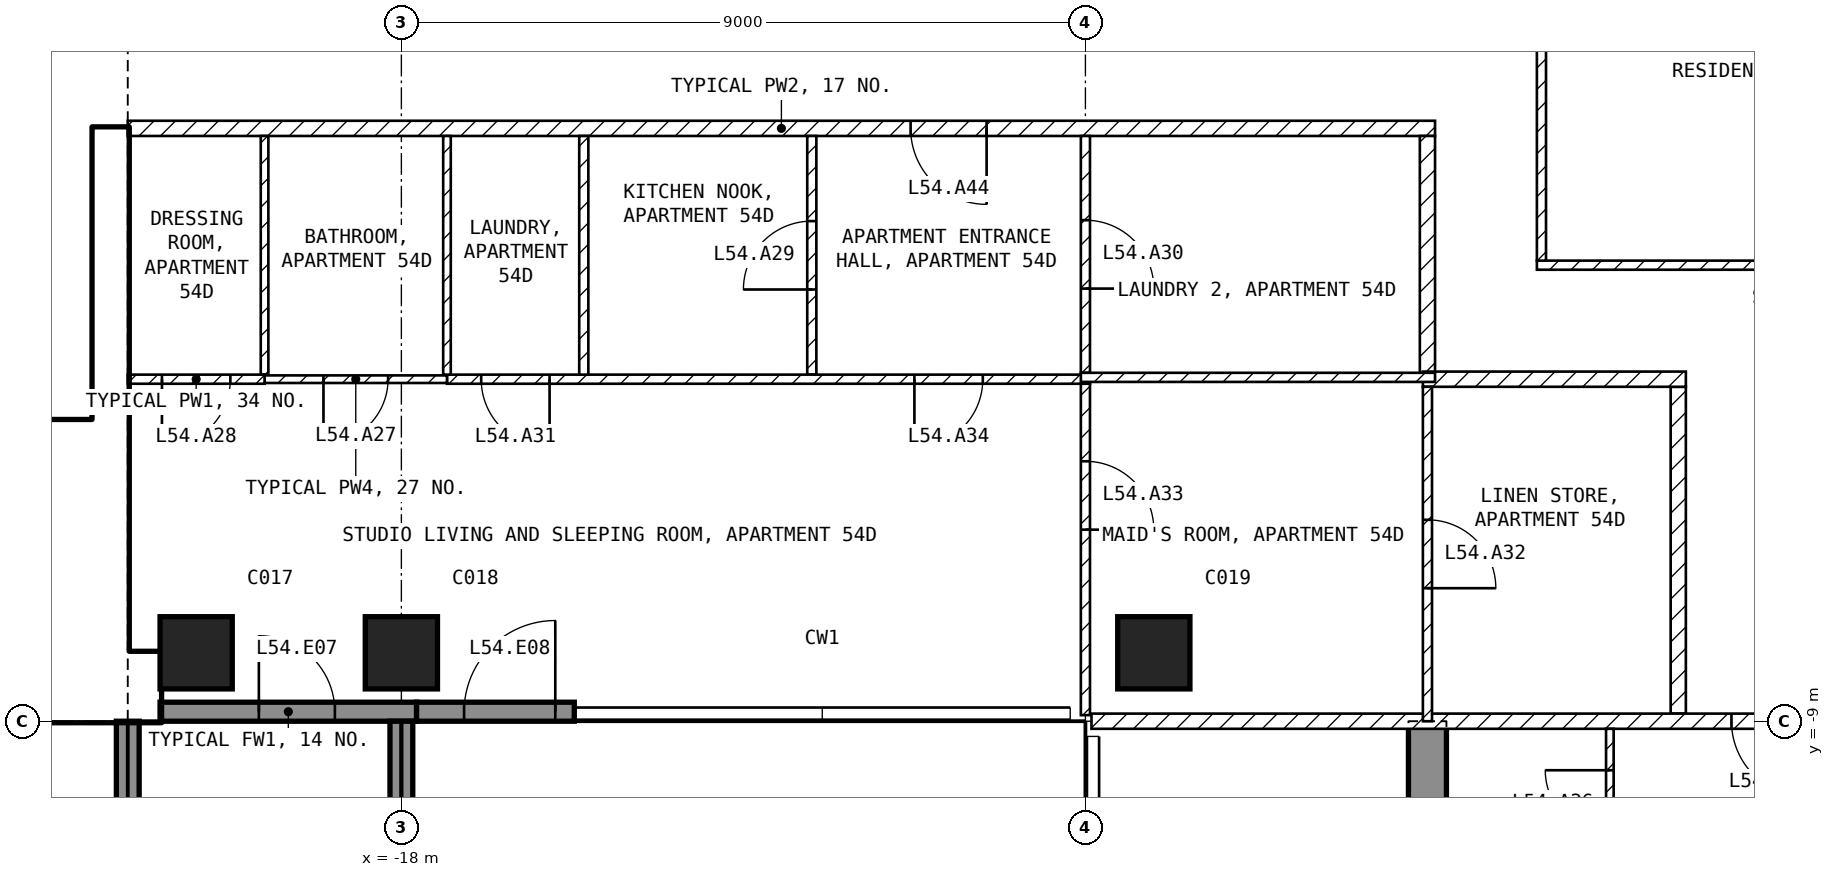
"""IFC4 building model, lengths in metres.
Left out: names, types, materials, properties, quantities, classifications, styles, units other than length and angle.
Written with IfcOpenShell. Run it as: python <this file> out.ifc"""

import sys

from ifc_helpers import new_model, si_unit, direction, frame, frame_2d, origin, origin_2d, place, context, subcontext, project, spatial, polyline, rectangle, outline, extrude, element, fill, save


model = new_model("IFC4")
c1 = context("Model", 3, precision=1e-05, world=origin(), true_north=direction((0.0, 1.0)))
c2 = subcontext(c1, "Body", "Model", "MODEL_VIEW")
j1 = project(units=[si_unit("LENGTHUNIT", "METRE"), si_unit("PLANEANGLEUNIT", "RADIAN")], contexts=[c1])
p1 = place(None, origin())
s1 = spatial("IfcSite", under=j1, at=p1, CompositionType="ELEMENT")
p2 = place(p1, origin())
s2 = spatial("IfcBuilding", under=s1, at=p2, CompositionType="ELEMENT")
p3 = place(p2, frame((0.0, 0.0, 215.6)))
s3 = spatial("IfcBuildingStorey", under=s2, at=p3, CompositionType="ELEMENT", Elevation=215.6)
for number, where, z_axis, x_axis in (
    (1, (-20.7, -8.1, -0.25), (0.0, 0.0, 1.0), (1.0, 0.0, 0.0)),
    (2, (-18.0, -8.1, -0.25), (0.0, 0.0, 1.0), (1.0, 0.0, 0.0)),
    (3, (-8.1, -8.1, -0.25), (0.0, 0.0, 1.0), (1.0, 0.0, 0.0)),
):
    element("IfcColumn", number, at=place(p3, frame(where, z_axis=z_axis, x_axis=x_axis)), inside=s3, PredefinedType="COLUMN", context=c2, shape_type="SweptSolid", body=[
        extrude(rectangle(XDim=0.95, YDim=0.95, at=origin_2d()), origin(), (0.0, 0.0, 1.0), 3.5),
    ])
p4 = place(p3, frame((-4.75, -20.225, -0.25), z_axis=(1.0, 0.0, 0.0), x_axis=(0.0, 1.0, 0.0)))
e4 = element("IfcWall", 4, at=p4, inside=s3, PredefinedType="SHEAR", context=c2, shape_type="SweptSolid", body=[
    extrude(outline(polyline([(0.0, 0.0), (6.725, 0.0), (6.725, 2.65), (9.125, 2.65), (9.125, 0.0), (11.225, 0.0), (11.225, 3.5), (0.0, 3.5), (0.0, 0.0)])), origin(), (0.0, 0.0, 1.0), 0.5),
])
p5 = place(p3, frame((-21.175, -8.875, 0.0), z_axis=(0.0, 0.0, 1.0), x_axis=(1.0, 0.0, 0.0)))
e5 = element("IfcWall", 5, at=p5, inside=s3, PredefinedType="SOLIDWALL", context=c2, shape_type="SweptSolid", body=[
    extrude(rectangle(XDim=3.375, YDim=0.25, at=frame_2d((1.688, 0.0))), origin(), (0.0, 0.0, 1.0), 3.25),
])
p6 = place(p5, frame((1.3, 0.0, 0.0)))
e6 = element("IfcOpeningElement", 6, at=p6, cuts=e5, PredefinedType="OPENING", context=c2, shape_type="SweptSolid", body=[
    extrude(rectangle(XDim=1.0, YDim=2.4, at=frame_2d((0.5, 1.2))), frame((0.0, 0.135, 0.0), z_axis=(0.0, -1.0, 0.0), x_axis=(1.0, 0.0, 0.0)), (0.0, 0.0, 1.0), 0.27),
])
p7 = place(p3, frame((-17.8, -8.875, 0.0), z_axis=(0.0, 0.0, 1.0), x_axis=(1.0, 0.0, 0.0)))
e7 = element("IfcWall", 7, at=p7, inside=s3, PredefinedType="SOLIDWALL", context=c2, shape_type="SweptSolid", body=[
    extrude(rectangle(XDim=2.075, YDim=0.25, at=frame_2d((1.038, 0.0))), origin(), (0.0, 0.0, 1.0), 3.25),
])
p8 = place(p7, frame((0.625, 0.0, 0.0)))
e8 = element("IfcOpeningElement", 8, at=p8, cuts=e7, PredefinedType="OPENING", context=c2, shape_type="SweptSolid", body=[
    extrude(rectangle(XDim=1.2, YDim=2.4, at=frame_2d((0.6, 1.2))), frame((0.0, 0.135, 0.0), z_axis=(0.0, -1.0, 0.0), x_axis=(1.0, 0.0, 0.0)), (0.0, 0.0, 1.0), 0.27),
])
for number, where, z_axis, x_axis in (
    (9, (-21.6, -9.0, 0.0), (0.0, 0.0, 1.0), (0.0, -1.0, 0.0)),
    (10, (-18.0, -9.0, 0.0), (0.0, 0.0, 1.0), (0.0, -1.0, 0.0)),
):
    element("IfcWall", number, at=place(p3, frame(where, z_axis=z_axis, x_axis=x_axis)), inside=s3, PredefinedType="SOLIDWALL", context=c2, shape_type="SweptSolid", body=[
        extrude(rectangle(XDim=2.7, YDim=0.3, at=frame_2d((1.35, 0.0))), origin(), (0.0, 0.0, 1.0), 3.25),
    ])
p9 = place(p3, frame((-30.2, -8.55, 0.0), z_axis=(0.0, 0.0, 1.0), x_axis=(1.0, 0.0, 0.0)))
e11 = element("IfcWall", 11, at=p9, inside=s3, PredefinedType="SHEAR", context=c2, shape_type="SweptSolid", body=[
    extrude(rectangle(XDim=9.025, YDim=0.9, at=frame_2d((4.512, 0.0))), origin(), (0.0, 0.0, 1.0), 3.25),
])
p10 = place(p3, frame((-21.825, -8.1, 0.0), z_axis=(0.0, 0.0, 1.0), x_axis=(0.0, 1.0, 0.0)))
e12 = element("IfcWall", 12, at=p10, inside=s3, PredefinedType="SHEAR", context=c2, shape_type="SweptSolid", body=[
    extrude(rectangle(XDim=6.9, YDim=0.45, at=frame_2d((3.45, 0.0))), origin(), (0.0, 0.0, 1.0), 3.25),
])
p11 = place(p3, frame((-28.35, -5.15, 0.0), z_axis=(0.0, 0.0, 1.0), x_axis=(1.0, 0.0, 0.0)))
e13 = element("IfcWall", 13, at=p11, inside=s3, PredefinedType="SOLIDWALL", context=c2, shape_type="SweptSolid", body=[
    extrude(rectangle(XDim=6.3, YDim=0.2, at=frame_2d((3.15, 0.0))), origin(), (0.0, 0.0, 1.0), 3.25),
])
p12 = place(p11, frame((5.1, 0.0, 0.0)))
e14 = element("IfcOpeningElement", 14, at=p12, cuts=e13, PredefinedType="OPENING", context=c2, shape_type="SweptSolid", body=[
    extrude(rectangle(XDim=1.0, YDim=2.1, at=frame_2d((0.5, 1.05))), frame((0.0, 0.11, 0.0), z_axis=(0.0, -1.0, 0.0), x_axis=(1.0, 0.0, 0.0)), (0.0, 0.0, 1.0), 0.22),
])
p13 = place(p3, frame((-3.06, -3.0, 0.0), z_axis=(0.0, 0.0, 1.0), x_axis=(1.0, 0.0, 0.0)))
e15 = element("IfcWall", 15, at=p13, inside=s3, PredefinedType="PARTITIONING", context=c2, shape_type="SweptSolid", body=[
    extrude(rectangle(XDim=6.12, YDim=0.12, at=frame_2d((3.06, 0.0))), origin(), (0.0, 0.0, 1.0), 3.25),
])
p14 = place(p3, frame((-3.0, 2.94, 0.0), z_axis=(0.0, 0.0, 1.0), x_axis=(0.0, -1.0, 0.0)))
e16 = element("IfcWall", 16, at=p14, inside=s3, PredefinedType="PARTITIONING", context=c2, shape_type="SweptSolid", body=[
    extrude(rectangle(XDim=5.88, YDim=0.12, at=frame_2d((2.94, 0.0))), origin(), (0.0, 0.0, 1.0), 3.25),
])
p15 = place(p3, frame((-4.4, -1.2, 0.0), z_axis=(0.0, 0.0, 1.0), x_axis=(-1.0, 0.0, 0.0)))
e17 = element("IfcWall", 17, at=p15, inside=s3, PredefinedType="PARTITIONING", context=c2, shape_type="SweptSolid", body=[
    extrude(rectangle(XDim=17.2, YDim=0.2, at=frame_2d((8.6, 0.0))), origin(), (0.0, 0.0, 1.0), 3.25),
])
p16 = place(p15, frame((5.9, 0.0, 0.0)))
e18 = element("IfcOpeningElement", 18, at=p16, cuts=e17, PredefinedType="OPENING", context=c2, shape_type="SweptSolid", body=[
    extrude(rectangle(XDim=1.0, YDim=2.1, at=frame_2d((0.5, 1.05))), frame((0.0, 0.11, 0.0), z_axis=(0.0, -1.0, 0.0), x_axis=(1.0, 0.0, 0.0)), (0.0, 0.0, 1.0), 0.22),
])
p17 = place(p3, frame((-4.5, -4.416, 0.0), z_axis=(0.0, 0.0, 1.0), x_axis=(0.0, 1.0, 0.0)))
e19 = element("IfcWall", 19, at=p17, inside=s3, PredefinedType="PARTITIONING", context=c2, shape_type="SweptSolid", body=[
    extrude(rectangle(XDim=3.116, YDim=0.2, at=frame_2d((1.558, 0.0))), origin(), (0.0, 0.0, 1.0), 3.25),
])
p18 = place(p3, frame((-1.2, -8.9, 0.0), z_axis=(0.0, 0.0, 1.0), x_axis=(0.0, 1.0, 0.0)))
e20 = element("IfcWall", 20, at=p18, inside=s3, PredefinedType="PARTITIONING", context=c2, shape_type="SweptSolid", body=[
    extrude(rectangle(XDim=4.3, YDim=0.2, at=frame_2d((2.15, 0.0))), origin(), (0.0, 0.0, 1.0), 3.25),
])
p19 = place(p3, frame((-1.1, -4.5, 0.0), z_axis=(0.0, 0.0, 1.0), x_axis=(-1.0, 0.0, 0.0)))
e21 = element("IfcWall", 21, at=p19, inside=s3, PredefinedType="PARTITIONING", context=c2, shape_type="SweptSolid", body=[
    extrude(rectangle(XDim=3.46, YDim=0.2, at=frame_2d((1.73, 0.0))), origin(), (0.0, 0.0, 1.0), 3.25),
])
p20 = place(p3, frame((8.92, -9.0, 0.0), z_axis=(0.0, 0.0, 1.0), x_axis=(-1.0, 0.0, 0.0)))
e22 = element("IfcWall", 22, at=p20, inside=s3, PredefinedType="PARTITIONING", context=c2, shape_type="SweptSolid", body=[
    extrude(rectangle(XDim=17.84, YDim=0.2, at=frame_2d((8.92, 0.0))), origin(), (0.0, 0.0, 1.0), 3.25),
])
p21 = place(p20, frame((8.42, 0.0, 0.0)))
e23 = element("IfcOpeningElement", 23, at=p21, cuts=e22, PredefinedType="OPENING", context=c2, shape_type="SweptSolid", body=[
    extrude(rectangle(XDim=1.0, YDim=2.1, at=frame_2d((0.5, 1.05))), frame((0.0, 0.11, 0.0), z_axis=(0.0, -1.0, 0.0), x_axis=(1.0, 0.0, 0.0)), (0.0, 0.0, 1.0), 0.22),
])
p22 = place(p3, frame((-12.6, -4.44, 0.0), z_axis=(0.0, 0.0, 1.0), x_axis=(0.0, 1.0, 0.0)))
e24 = element("IfcWall", 24, at=p22, inside=s3, PredefinedType="PARTITIONING", context=c2, shape_type="SweptSolid", body=[
    extrude(rectangle(XDim=3.14, YDim=0.12, at=frame_2d((1.57, 0.0))), origin(), (0.0, 0.0, 1.0), 3.25),
])
p23 = place(p22, frame((1.12, 0.0, 0.0)))
e25 = element("IfcOpeningElement", 25, at=p23, cuts=e24, PredefinedType="OPENING", context=c2, shape_type="SweptSolid", body=[
    extrude(rectangle(XDim=0.9, YDim=2.1, at=frame_2d((0.45, 1.05))), frame((0.0, 0.07, 0.0), z_axis=(0.0, -1.0, 0.0), x_axis=(1.0, 0.0, 0.0)), (0.0, 0.0, 1.0), 0.14),
])
p24 = place(p3, frame((-8.94, -4.5, 0.0), z_axis=(0.0, 0.0, 1.0), x_axis=(-1.0, 0.0, 0.0)))
e26 = element("IfcWall", 26, at=p24, inside=s3, PredefinedType="PARTITIONING", context=c2, shape_type="SweptSolid", body=[
    extrude(rectangle(XDim=8.46, YDim=0.12, at=frame_2d((4.23, 0.0))), origin(), (0.0, 0.0, 1.0), 3.25),
])
p25 = place(p24, frame((7.11, 0.0, 0.0)))
e27 = element("IfcOpeningElement", 27, at=p25, cuts=e26, PredefinedType="OPENING", context=c2, shape_type="SweptSolid", body=[
    extrude(rectangle(XDim=0.9, YDim=2.1, at=frame_2d((0.45, 1.05))), frame((0.0, 0.07, 0.0), z_axis=(0.0, -1.0, 0.0), x_axis=(1.0, 0.0, 0.0)), (0.0, 0.0, 1.0), 0.14),
])
p26 = place(p24, frame((1.41, 0.0, 0.0)))
e28 = element("IfcOpeningElement", 28, at=p26, cuts=e26, PredefinedType="OPENING", context=c2, shape_type="SweptSolid", body=[
    extrude(rectangle(XDim=0.9, YDim=2.1, at=frame_2d((0.45, 1.05))), frame((0.0, 0.07, 0.0), z_axis=(0.0, -1.0, 0.0), x_axis=(1.0, 0.0, 0.0)), (0.0, 0.0, 1.0), 0.14),
])
p27 = place(p3, frame((-9.0, -1.3, 0.0), z_axis=(0.0, 0.0, 1.0), x_axis=(0.0, -1.0, 0.0)))
e29 = element("IfcWall", 29, at=p27, inside=s3, PredefinedType="PARTITIONING", context=c2, shape_type="SweptSolid", body=[
    extrude(rectangle(XDim=3.116, YDim=0.12, at=frame_2d((1.558, 0.0))), origin(), (0.0, 0.0, 1.0), 3.25),
])
p28 = place(p27, frame((1.108, 0.0, 0.0)))
e30 = element("IfcOpeningElement", 30, at=p28, cuts=e29, PredefinedType="OPENING", context=c2, shape_type="SweptSolid", body=[
    extrude(rectangle(XDim=0.9, YDim=2.1, at=frame_2d((0.45, 1.05))), frame((0.0, 0.07, 0.0), z_axis=(0.0, -1.0, 0.0), x_axis=(1.0, 0.0, 0.0)), (0.0, 0.0, 1.0), 0.14),
])
p29 = place(p3, frame((-15.6, -4.44, 0.0), z_axis=(0.0, 0.0, 1.0), x_axis=(0.0, 1.0, 0.0)))
e31 = element("IfcWall", 31, at=p29, inside=s3, PredefinedType="PARTITIONING", context=c2, shape_type="SweptSolid", body=[
    extrude(rectangle(XDim=3.14, YDim=0.12, at=frame_2d((1.57, 0.0))), origin(), (0.0, 0.0, 1.0), 3.25),
])
for number, where, z_axis, x_axis in (
    (32, (-17.4, -4.44, 0.0), (0.0, 0.0, 1.0), (0.0, 1.0, 0.0)),
    (33, (-19.8, -4.44, 0.0), (0.0, 0.0, 1.0), (0.0, 1.0, 0.0)),
):
    element("IfcWall", number, at=place(p3, frame(where, z_axis=z_axis, x_axis=x_axis)), inside=s3, PredefinedType="PARTITIONING", context=c2, shape_type="SweptSolid", body=[
        extrude(rectangle(XDim=3.14, YDim=0.1, at=frame_2d((1.57, 0.0))), origin(), (0.0, 0.0, 1.0), 3.25),
    ])
p30 = place(p3, frame((-17.4, -4.5, 0.0), z_axis=(0.0, 0.0, 1.0), x_axis=(-1.0, 0.0, 0.0)))
e34 = element("IfcWall", 34, at=p30, inside=s3, PredefinedType="PARTITIONING", context=c2, shape_type="SweptSolid", body=[
    extrude(rectangle(XDim=2.4, YDim=0.1, at=frame_2d((1.2, 0.0))), origin(), (0.0, 0.0, 1.0), 3.25),
])
p31 = place(p30, frame((0.775, 0.0, 0.0)))
e35 = element("IfcOpeningElement", 35, at=p31, cuts=e34, PredefinedType="OPENING", context=c2, shape_type="SweptSolid", body=[
    extrude(rectangle(XDim=0.85, YDim=2.1, at=frame_2d((0.425, 1.05))), frame((0.0, 0.06, 0.0), z_axis=(0.0, -1.0, 0.0), x_axis=(1.0, 0.0, 0.0)), (0.0, 0.0, 1.0), 0.12),
])
p32 = place(p3, frame((-19.8, -4.5, 0.0), z_axis=(0.0, 0.0, 1.0), x_axis=(-1.0, 0.0, 0.0)))
e36 = element("IfcWall", 36, at=p32, inside=s3, PredefinedType="PARTITIONING", context=c2, shape_type="SweptSolid", body=[
    extrude(rectangle(XDim=1.8, YDim=0.12, at=frame_2d((0.9, 0.0))), origin(), (0.0, 0.0, 1.0), 3.25),
])
p33 = place(p32, frame((0.45, 0.0, 0.0)))
e37 = element("IfcOpeningElement", 37, at=p33, cuts=e36, PredefinedType="OPENING", context=c2, shape_type="SweptSolid", body=[
    extrude(rectangle(XDim=0.9, YDim=2.1, at=frame_2d((0.45, 1.05))), frame((0.0, 0.07, 0.0), z_axis=(0.0, -1.0, 0.0), x_axis=(1.0, 0.0, 0.0)), (0.0, 0.0, 1.0), 0.14),
])
p34 = place(p3, frame((-9.0, -4.56, 0.0), z_axis=(0.0, 0.0, 1.0), x_axis=(0.0, -1.0, 0.0)))
e38 = element("IfcWall", 38, at=p34, inside=s3, PredefinedType="PARTITIONING", context=c2, shape_type="SweptSolid", body=[
    extrude(rectangle(XDim=4.36, YDim=0.12, at=frame_2d((2.18, 0.0))), origin(), (0.0, 0.0, 1.0), 3.25),
])
p35 = place(p34, frame((1.02, 0.0, 0.0)))
e39 = element("IfcOpeningElement", 39, at=p35, cuts=e38, PredefinedType="OPENING", context=c2, shape_type="SweptSolid", body=[
    extrude(rectangle(XDim=0.9, YDim=2.1, at=frame_2d((0.45, 1.05))), frame((0.0, 0.07, 0.0), z_axis=(0.0, -1.0, 0.0), x_axis=(1.0, 0.0, 0.0)), (0.0, 0.0, 1.0), 0.14),
])
p36 = place(p3, frame((-4.4, -4.476, 0.0), z_axis=(0.0, 0.0, 1.0), x_axis=(-1.0, 0.0, 0.0)))
e40 = element("IfcWall", 40, at=p36, inside=s3, PredefinedType="PARTITIONING", context=c2, shape_type="SweptSolid", body=[
    extrude(rectangle(XDim=4.66, YDim=0.12, at=frame_2d((2.33, 0.0))), origin(), (0.0, 0.0, 1.0), 3.25),
])
p37 = place(p3, frame((-4.5, -4.6, 0.0), z_axis=(0.0, 0.0, 1.0), x_axis=(0.0, -1.0, 0.0)))
e41 = element("IfcWall", 41, at=p37, inside=s3, PredefinedType="PARTITIONING", context=c2, shape_type="SweptSolid", body=[
    extrude(rectangle(XDim=4.4, YDim=0.12, at=frame_2d((2.2, 0.0))), origin(), (0.0, 0.0, 1.0), 3.25),
])
p38 = place(p37, frame((1.75, 0.0, 0.0)))
e42 = element("IfcOpeningElement", 42, at=p38, cuts=e41, PredefinedType="OPENING", context=c2, shape_type="SweptSolid", body=[
    extrude(rectangle(XDim=0.9, YDim=2.1, at=frame_2d((0.45, 1.05))), frame((0.0, 0.07, 0.0), z_axis=(0.0, -1.0, 0.0), x_axis=(1.0, 0.0, 0.0)), (0.0, 0.0, 1.0), 0.14),
])
p39 = place(p3, frame((-2.1, -11.04, 0.0), z_axis=(0.0, 0.0, 1.0), x_axis=(0.0, 1.0, 0.0)))
e43 = element("IfcWall", 43, at=p39, inside=s3, PredefinedType="PARTITIONING", context=c2, shape_type="SweptSolid", body=[
    extrude(rectangle(XDim=1.94, YDim=0.1, at=frame_2d((0.97, 0.0))), origin(), (0.0, 0.0, 1.0), 3.25),
])
p40 = place(p39, frame((0.545, 0.0, 0.0)))
e44 = element("IfcOpeningElement", 44, at=p40, cuts=e43, PredefinedType="OPENING", context=c2, shape_type="SweptSolid", body=[
    extrude(rectangle(XDim=0.85, YDim=2.1, at=frame_2d((0.425, 1.05))), frame((0.0, 0.06, 0.0), z_axis=(0.0, -1.0, 0.0), x_axis=(1.0, 0.0, 0.0)), (0.0, 0.0, 1.0), 0.12),
])
p41 = place(p6, origin())
e45 = element("IfcDoor", 45, at=p41, inside=s3, OperationType="SINGLE_SWING_LEFT", PredefinedType="DOOR", context=c2, shape_type="SweptSolid", body=[
    extrude(rectangle(XDim=1.0, YDim=2.4, at=frame_2d((0.5, 1.2))), frame((0.0, 0.025, 0.0), z_axis=(0.0, -1.0, 0.0), x_axis=(1.0, 0.0, 0.0)), (0.0, 0.0, 1.0), 0.05),
])
fill(e6, e45)
p42 = place(p8, origin())
e46 = element("IfcDoor", 46, at=p42, inside=s3, OperationType="SINGLE_SWING_RIGHT", PredefinedType="DOOR", context=c2, shape_type="SweptSolid", body=[
    extrude(rectangle(XDim=1.2, YDim=2.4, at=frame_2d((0.6, 1.2))), frame((0.0, 0.025, 0.0), z_axis=(0.0, -1.0, 0.0), x_axis=(1.0, 0.0, 0.0)), (0.0, 0.0, 1.0), 0.05),
])
fill(e8, e46)
p43 = place(p12, origin())
e47 = element("IfcDoor", 47, at=p43, inside=s3, OperationType="SINGLE_SWING_LEFT", PredefinedType="DOOR", context=c2, shape_type="SweptSolid", body=[
    extrude(rectangle(XDim=1.0, YDim=2.1, at=frame_2d((0.5, 1.05))), frame((0.0, 0.025, 0.0), z_axis=(0.0, -1.0, 0.0), x_axis=(1.0, 0.0, 0.0)), (0.0, 0.0, 1.0), 0.05),
])
fill(e14, e47)
p44 = place(p31, origin())
e48 = element("IfcDoor", 48, at=p44, inside=s3, OperationType="SINGLE_SWING_RIGHT", PredefinedType="DOOR", context=c2, shape_type="SweptSolid", body=[
    extrude(rectangle(XDim=0.85, YDim=2.1, at=frame_2d((0.425, 1.05))), frame((0.0, 0.025, 0.0), z_axis=(0.0, -1.0, 0.0), x_axis=(1.0, 0.0, 0.0)), (0.0, 0.0, 1.0), 0.05),
])
fill(e35, e48)
p45 = place(p33, origin())
e49 = element("IfcDoor", 49, at=p45, inside=s3, OperationType="SINGLE_SWING_RIGHT", PredefinedType="DOOR", context=c2, shape_type="SweptSolid", body=[
    extrude(rectangle(XDim=0.9, YDim=2.1, at=frame_2d((0.45, 1.05))), frame((0.0, 0.025, 0.0), z_axis=(0.0, -1.0, 0.0), x_axis=(1.0, 0.0, 0.0)), (0.0, 0.0, 1.0), 0.05),
])
fill(e37, e49)
p46 = place(p23, origin())
e50 = element("IfcDoor", 50, at=p46, inside=s3, OperationType="SINGLE_SWING_LEFT", PredefinedType="DOOR", context=c2, shape_type="SweptSolid", body=[
    extrude(rectangle(XDim=0.9, YDim=2.1, at=frame_2d((0.45, 1.05))), frame((0.0, 0.025, 0.0), z_axis=(0.0, -1.0, 0.0), x_axis=(1.0, 0.0, 0.0)), (0.0, 0.0, 1.0), 0.05),
])
fill(e25, e50)
p47 = place(p28, origin())
e51 = element("IfcDoor", 51, at=p47, inside=s3, OperationType="SINGLE_SWING_RIGHT", PredefinedType="DOOR", context=c2, shape_type="SweptSolid", body=[
    extrude(rectangle(XDim=0.9, YDim=2.1, at=frame_2d((0.45, 1.05))), frame((0.0, 0.025, 0.0), z_axis=(0.0, -1.0, 0.0), x_axis=(1.0, 0.0, 0.0)), (0.0, 0.0, 1.0), 0.05),
])
fill(e30, e51)
p48 = place(p25, origin())
e52 = element("IfcDoor", 52, at=p48, inside=s3, OperationType="SINGLE_SWING_LEFT", PredefinedType="DOOR", context=c2, shape_type="SweptSolid", body=[
    extrude(rectangle(XDim=0.9, YDim=2.1, at=frame_2d((0.45, 1.05))), frame((0.0, 0.025, 0.0), z_axis=(0.0, -1.0, 0.0), x_axis=(1.0, 0.0, 0.0)), (0.0, 0.0, 1.0), 0.05),
])
fill(e27, e52)
p49 = place(p38, origin())
e53 = element("IfcDoor", 53, at=p49, inside=s3, OperationType="SINGLE_SWING_RIGHT", PredefinedType="DOOR", context=c2, shape_type="SweptSolid", body=[
    extrude(rectangle(XDim=0.9, YDim=2.1, at=frame_2d((0.45, 1.05))), frame((0.0, 0.025, 0.0), z_axis=(0.0, -1.0, 0.0), x_axis=(1.0, 0.0, 0.0)), (0.0, 0.0, 1.0), 0.05),
])
fill(e42, e53)
p50 = place(p35, origin())
e54 = element("IfcDoor", 54, at=p50, inside=s3, OperationType="SINGLE_SWING_RIGHT", PredefinedType="DOOR", context=c2, shape_type="SweptSolid", body=[
    extrude(rectangle(XDim=0.9, YDim=2.1, at=frame_2d((0.45, 1.05))), frame((0.0, 0.025, 0.0), z_axis=(0.0, -1.0, 0.0), x_axis=(1.0, 0.0, 0.0)), (0.0, 0.0, 1.0), 0.05),
])
fill(e39, e54)
p51 = place(p26, origin())
e55 = element("IfcDoor", 55, at=p51, inside=s3, OperationType="SINGLE_SWING_RIGHT", PredefinedType="DOOR", context=c2, shape_type="SweptSolid", body=[
    extrude(rectangle(XDim=0.9, YDim=2.1, at=frame_2d((0.45, 1.05))), frame((0.0, 0.025, 0.0), z_axis=(0.0, -1.0, 0.0), x_axis=(1.0, 0.0, 0.0)), (0.0, 0.0, 1.0), 0.05),
])
fill(e28, e55)
p52 = place(p21, origin())
e56 = element("IfcDoor", 56, at=p52, inside=s3, OperationType="SINGLE_SWING_LEFT", PredefinedType="DOOR", context=c2, shape_type="SweptSolid", body=[
    extrude(rectangle(XDim=1.0, YDim=2.1, at=frame_2d((0.5, 1.05))), frame((0.0, 0.025, 0.0), z_axis=(0.0, -1.0, 0.0), x_axis=(1.0, 0.0, 0.0)), (0.0, 0.0, 1.0), 0.05),
])
fill(e23, e56)
p53 = place(p40, origin())
e57 = element("IfcDoor", 57, at=p53, inside=s3, OperationType="SINGLE_SWING_RIGHT", PredefinedType="DOOR", context=c2, shape_type="SweptSolid", body=[
    extrude(rectangle(XDim=0.85, YDim=2.1, at=frame_2d((0.425, 1.05))), frame((0.0, 0.025, 0.0), z_axis=(0.0, -1.0, 0.0), x_axis=(1.0, 0.0, 0.0)), (0.0, 0.0, 1.0), 0.05),
])
fill(e44, e57)
p54 = place(p16, origin())
e58 = element("IfcDoor", 58, at=p54, inside=s3, OperationType="SINGLE_SWING_LEFT", PredefinedType="DOOR", context=c2, shape_type="SweptSolid", body=[
    extrude(rectangle(XDim=1.0, YDim=2.1, at=frame_2d((0.5, 1.05))), frame((0.0, 0.025, 0.0), z_axis=(0.0, -1.0, 0.0), x_axis=(1.0, 0.0, 0.0)), (0.0, 0.0, 1.0), 0.05),
])
fill(e18, e58)
save(model, sys.argv[1])
